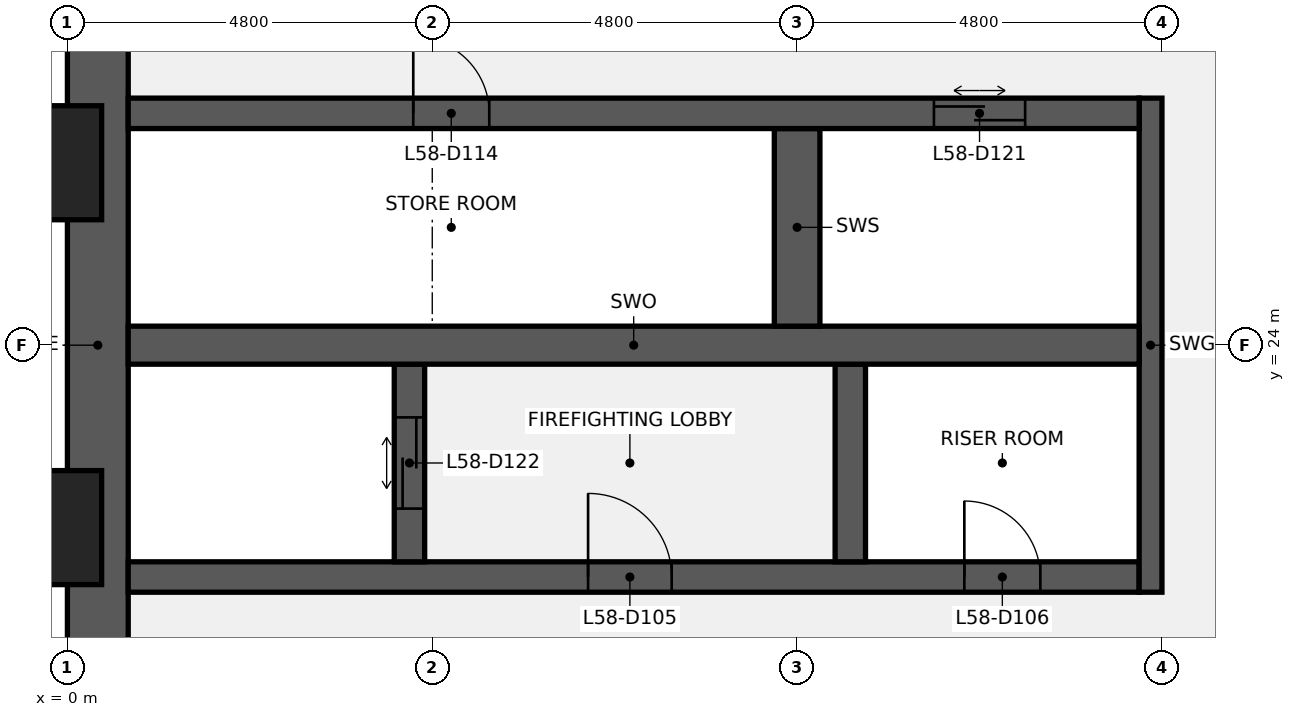
"""IFC4 building model, lengths in metres.
Left out: names, types, materials, properties, quantities, classifications, styles, units other than length and angle.
Written with IfcOpenShell. Run it as: python <this file> out.ifc"""

import sys

from ifc_helpers import new_model, si_unit, direction, frame, frame_2d, origin, origin_2d, place, context, subcontext, project, spatial, rectangle, extrude, element, fill, save


model = new_model("IFC4")
c1 = context("Model", 3, precision=1e-05, world=origin(), true_north=direction((0.0, 1.0)))
c2 = subcontext(c1, "Body", "Model", "MODEL_VIEW")
j1 = project(units=[si_unit("LENGTHUNIT", "METRE"), si_unit("PLANEANGLEUNIT", "RADIAN")], contexts=[c1])
p1 = place(None, origin())
s1 = spatial("IfcSite", under=j1, at=p1, CompositionType="ELEMENT")
p2 = place(p1, origin())
s2 = spatial("IfcBuilding", under=s1, at=p2, CompositionType="ELEMENT")
p3 = place(p2, frame((0.0, 0.0, 261.2)))
s3 = spatial("IfcBuildingStorey", under=s2, at=p3, CompositionType="ELEMENT", Elevation=261.2)
p4 = place(p3, frame((0.4, 9.6, 0.0), z_axis=(0.0, 0.0, 1.0), x_axis=(0.0, 1.0, 0.0)))
e1 = element("IfcWall", 1, at=p4, inside=s3, PredefinedType="SHEAR", context=c2, shape_type="SweptSolid", body=[
    extrude(rectangle(XDim=28.8, YDim=0.8, at=frame_2d((14.4, 0.0))), origin(), (0.0, 0.0, 1.0), 3.7),
])
p5 = place(p4, frame((8.85, 0.0, 0.9)))
e2 = element("IfcOpeningElement", 2, at=p5, cuts=e1, PredefinedType="OPENING", context=c2, shape_type="SweptSolid", body=[
    extrude(rectangle(XDim=1.5, YDim=1.5, at=frame_2d((0.75, 0.75))), frame((0.0, 0.41, 0.0), z_axis=(0.0, -1.0, 0.0), x_axis=(1.0, 0.0, 0.0)), (0.0, 0.0, 1.0), 0.82),
])
p6 = place(p4, frame((18.45, 0.0, 0.9)))
e3 = element("IfcOpeningElement", 3, at=p6, cuts=e1, PredefinedType="OPENING", context=c2, shape_type="SweptSolid", body=[
    extrude(rectangle(XDim=1.5, YDim=1.5, at=frame_2d((0.75, 0.75))), frame((0.0, 0.41, 0.0), z_axis=(0.0, -1.0, 0.0), x_axis=(1.0, 0.0, 0.0)), (0.0, 0.0, 1.0), 0.82),
])
p7 = place(p3, frame((0.8, 20.95, 0.0), z_axis=(0.0, 0.0, 1.0), x_axis=(1.0, 0.0, 0.0)))
e4 = element("IfcWall", 4, at=p7, inside=s3, PredefinedType="SHEAR", context=c2, shape_type="SweptSolid", body=[
    extrude(rectangle(XDim=13.3, YDim=0.4, at=frame_2d((6.65, 0.0))), origin(), (0.0, 0.0, 1.0), 3.7),
])
p8 = place(p7, frame((6.05, 0.0, 0.0)))
e5 = element("IfcOpeningElement", 5, at=p8, cuts=e4, PredefinedType="OPENING", context=c2, shape_type="SweptSolid", body=[
    extrude(rectangle(XDim=1.1, YDim=2.1, at=frame_2d((0.55, 1.05))), frame((0.0, 0.21, 0.0), z_axis=(0.0, -1.0, 0.0), x_axis=(1.0, 0.0, 0.0)), (0.0, 0.0, 1.0), 0.42),
])
p9 = place(p7, frame((11.0, 0.0, 0.0)))
e6 = element("IfcOpeningElement", 6, at=p9, cuts=e4, PredefinedType="OPENING", context=c2, shape_type="SweptSolid", body=[
    extrude(rectangle(XDim=1.0, YDim=2.1, at=frame_2d((0.5, 1.05))), frame((0.0, 0.21, 0.0), z_axis=(0.0, -1.0, 0.0), x_axis=(1.0, 0.0, 0.0)), (0.0, 0.0, 1.0), 0.42),
])
p10 = place(p3, frame((14.25, 20.75, 0.0), z_axis=(0.0, 0.0, 1.0), x_axis=(0.0, 1.0, 0.0)))
e7 = element("IfcWall", 7, at=p10, inside=s3, PredefinedType="SHEAR", context=c2, shape_type="SweptSolid", body=[
    extrude(rectangle(XDim=6.5, YDim=0.3, at=frame_2d((3.25, 0.0))), origin(), (0.0, 0.0, 1.0), 3.7),
])
p11 = place(p3, frame((4.5, 21.15, 0.0), z_axis=(0.0, 0.0, 1.0), x_axis=(0.0, 1.0, 0.0)))
e8 = element("IfcWall", 8, at=p11, inside=s3, PredefinedType="SHEAR", context=c2, shape_type="SweptSolid", body=[
    extrude(rectangle(XDim=2.6, YDim=0.4, at=frame_2d((1.3, 0.0))), origin(), (0.0, 0.0, 1.0), 3.7),
])
p12 = place(p11, frame((0.7, 0.0, 0.0)))
e9 = element("IfcOpeningElement", 9, at=p12, cuts=e8, PredefinedType="OPENING", context=c2, shape_type="SweptSolid", body=[
    extrude(rectangle(XDim=1.2, YDim=2.1, at=frame_2d((0.6, 1.05))), frame((0.0, 0.21, 0.0), z_axis=(0.0, -1.0, 0.0), x_axis=(1.0, 0.0, 0.0)), (0.0, 0.0, 1.0), 0.42),
])
p13 = place(p3, frame((10.3, 21.15, 0.0), z_axis=(0.0, 0.0, 1.0), x_axis=(0.0, 1.0, 0.0)))
e10 = element("IfcWall", 10, at=p13, inside=s3, PredefinedType="SHEAR", context=c2, shape_type="SweptSolid", body=[
    extrude(rectangle(XDim=2.6, YDim=0.4, at=frame_2d((1.3, 0.0))), origin(), (0.0, 0.0, 1.0), 3.7),
])
p14 = place(p3, frame((0.8, 24.0, 0.0), z_axis=(0.0, 0.0, 1.0), x_axis=(1.0, 0.0, 0.0)))
e11 = element("IfcWall", 11, at=p14, inside=s3, PredefinedType="SHEAR", context=c2, shape_type="SweptSolid", body=[
    extrude(rectangle(XDim=13.3, YDim=0.5, at=frame_2d((6.65, 0.0))), origin(), (0.0, 0.0, 1.0), 3.7),
])
p15 = place(p3, frame((9.6, 24.25, 0.0), z_axis=(0.0, 0.0, 1.0), x_axis=(0.0, 1.0, 0.0)))
e12 = element("IfcWall", 12, at=p15, inside=s3, PredefinedType="SHEAR", context=c2, shape_type="SweptSolid", body=[
    extrude(rectangle(XDim=2.6, YDim=0.6, at=frame_2d((1.3, 0.0))), origin(), (0.0, 0.0, 1.0), 3.7),
])
p16 = place(p3, frame((0.8, 27.05, 0.0), z_axis=(0.0, 0.0, 1.0), x_axis=(1.0, 0.0, 0.0)))
e13 = element("IfcWall", 13, at=p16, inside=s3, PredefinedType="SHEAR", context=c2, shape_type="SweptSolid", body=[
    extrude(rectangle(XDim=13.3, YDim=0.4, at=frame_2d((6.65, 0.0))), origin(), (0.0, 0.0, 1.0), 3.7),
])
p17 = place(p16, frame((3.75, 0.0, 0.0)))
e14 = element("IfcOpeningElement", 14, at=p17, cuts=e13, PredefinedType="OPENING", context=c2, shape_type="SweptSolid", body=[
    extrude(rectangle(XDim=1.0, YDim=2.1, at=frame_2d((0.5, 1.05))), frame((0.0, 0.21, 0.0), z_axis=(0.0, -1.0, 0.0), x_axis=(1.0, 0.0, 0.0)), (0.0, 0.0, 1.0), 0.42),
])
p18 = place(p16, frame((10.6, 0.0, 0.0)))
e15 = element("IfcOpeningElement", 15, at=p18, cuts=e13, PredefinedType="OPENING", context=c2, shape_type="SweptSolid", body=[
    extrude(rectangle(XDim=1.2, YDim=2.1, at=frame_2d((0.6, 1.05))), frame((0.0, 0.21, 0.0), z_axis=(0.0, -1.0, 0.0), x_axis=(1.0, 0.0, 0.0)), (0.0, 0.0, 1.0), 0.42),
])
for number, where, z_axis, x_axis in (
    (16, (-0.75, 21.6, 0.0), (0.0, 0.0, 1.0), (0.0, 1.0, 0.0)),
    (17, (-0.75, 26.4, 0.0), (0.0, 0.0, 1.0), (0.0, 1.0, 0.0)),
):
    element("IfcColumn", number, at=place(p3, frame(where, z_axis=z_axis, x_axis=x_axis)), inside=s3, PredefinedType="PILASTER", context=c2, shape_type="SweptSolid", body=[
        extrude(rectangle(XDim=2.4, YDim=1.5, at=origin_2d()), origin(), (0.0, 0.0, 1.0), 4.0),
    ])
p19 = place(p8, origin())
e18 = element("IfcDoor", 18, at=p19, inside=s3, OperationType="SINGLE_SWING_LEFT", PredefinedType="DOOR", context=c2, shape_type="SweptSolid", body=[
    extrude(rectangle(XDim=1.1, YDim=2.1, at=frame_2d((0.55, 1.05))), frame((0.0, 0.025, 0.0), z_axis=(0.0, -1.0, 0.0), x_axis=(1.0, 0.0, 0.0)), (0.0, 0.0, 1.0), 0.05),
])
fill(e5, e18)
p20 = place(p9, origin())
e19 = element("IfcDoor", 19, at=p20, inside=s3, OperationType="SINGLE_SWING_LEFT", PredefinedType="DOOR", context=c2, shape_type="SweptSolid", body=[
    extrude(rectangle(XDim=1.0, YDim=2.1, at=frame_2d((0.5, 1.05))), frame((0.0, 0.025, 0.0), z_axis=(0.0, -1.0, 0.0), x_axis=(1.0, 0.0, 0.0)), (0.0, 0.0, 1.0), 0.05),
])
fill(e6, e19)
p21 = place(p17, origin())
e20 = element("IfcDoor", 20, at=p21, inside=s3, OperationType="SINGLE_SWING_LEFT", PredefinedType="DOOR", context=c2, shape_type="SweptSolid", body=[
    extrude(rectangle(XDim=1.0, YDim=2.1, at=frame_2d((0.5, 1.05))), frame((0.0, 0.025, 0.0), z_axis=(0.0, -1.0, 0.0), x_axis=(1.0, 0.0, 0.0)), (0.0, 0.0, 1.0), 0.05),
])
fill(e14, e20)
p22 = place(p18, origin())
e21 = element("IfcDoor", 21, at=p22, inside=s3, OperationType="DOUBLE_DOOR_SLIDING", PredefinedType="DOOR", context=c2, shape_type="SweptSolid", body=[
    extrude(rectangle(XDim=1.2, YDim=2.1, at=frame_2d((0.6, 1.05))), frame((0.0, 0.025, 0.0), z_axis=(0.0, -1.0, 0.0), x_axis=(1.0, 0.0, 0.0)), (0.0, 0.0, 1.0), 0.05),
])
fill(e15, e21)
p23 = place(p12, origin())
e22 = element("IfcDoor", 22, at=p23, inside=s3, OperationType="DOUBLE_DOOR_SLIDING", PredefinedType="DOOR", context=c2, shape_type="SweptSolid", body=[
    extrude(rectangle(XDim=1.2, YDim=2.1, at=frame_2d((0.6, 1.05))), frame((0.0, 0.025, 0.0), z_axis=(0.0, -1.0, 0.0), x_axis=(1.0, 0.0, 0.0)), (0.0, 0.0, 1.0), 0.05),
])
fill(e9, e22)
save(model, sys.argv[1])
